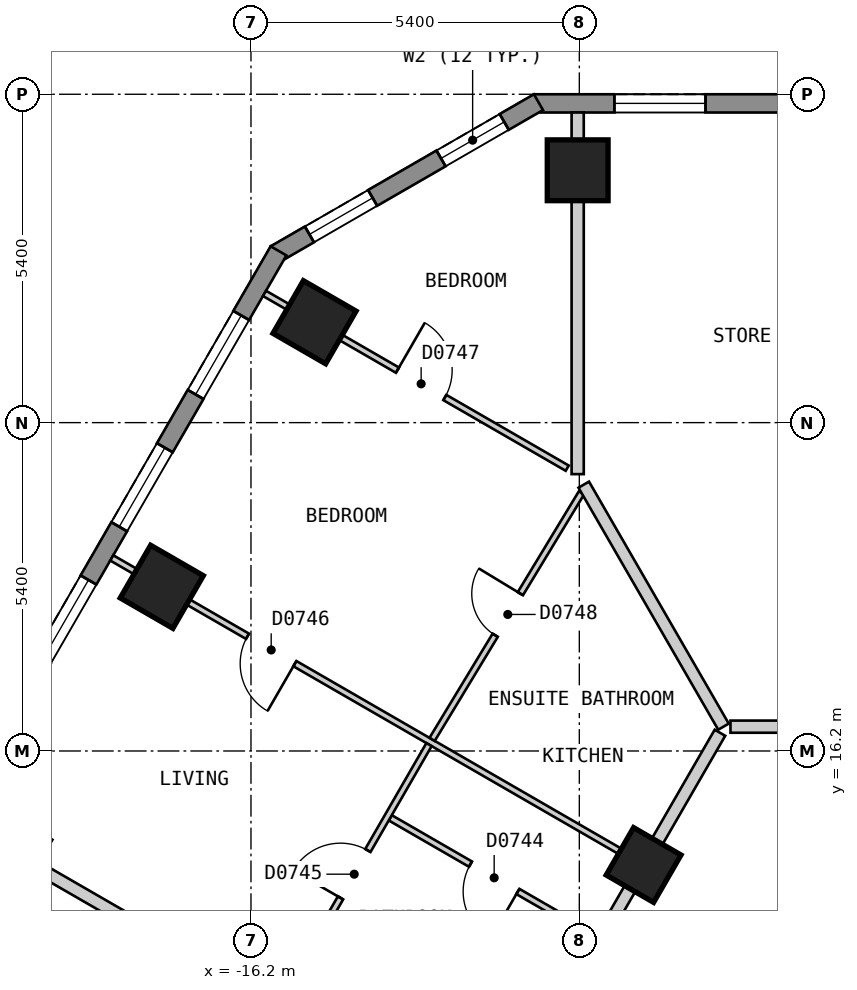
"""IFC4 building model, lengths in metres.
Left out: names, types, materials, properties, quantities, classifications, styles, units other than length and angle.
Written with IfcOpenShell. Run it as: python <this file> out.ifc"""

import sys

from ifc_helpers import new_model, si_unit, direction, frame, frame_2d, origin, origin_2d, place, context, subcontext, project, spatial, polyline, rectangle, outline, extrude, element, fill, save


model = new_model("IFC4")
c1 = context("Model", 3, precision=1e-05, world=origin(), true_north=direction((0.0, 1.0)))
c2 = subcontext(c1, "Body", "Model", "MODEL_VIEW")
j1 = project(units=[si_unit("LENGTHUNIT", "METRE"), si_unit("PLANEANGLEUNIT", "RADIAN")], contexts=[c1])
p1 = place(None, origin())
s1 = spatial("IfcSite", under=j1, at=p1, CompositionType="ELEMENT")
p2 = place(p1, origin())
s2 = spatial("IfcBuilding", under=s1, at=p2, CompositionType="ELEMENT")
p3 = place(p2, frame((0.0, 0.0, 105.0)))
s3 = spatial("IfcBuildingStorey", under=s2, at=p3, CompositionType="ELEMENT", Elevation=105.0)
for number, where, z_axis, x_axis in (
    (1, (-10.827, 25.75, 0.0), (0.0, 0.0, 1.0), (-1.0, 0.0, 0.0)),
    (2, (-15.155, 23.251, 0.0), (0.0, 0.0, 1.0), (-0.5, -0.866, 0.0)),
    (3, (-17.667, 18.9, 0.0), (0.0, 0.0, 1.0), (-0.5, -0.866, 0.0)),
):
    element("IfcColumn", number, at=place(p3, frame(where, z_axis=z_axis, x_axis=x_axis)), inside=s3, PredefinedType="COLUMN", context=c2, shape_type="SweptSolid", body=[
        extrude(rectangle(XDim=1.0, YDim=1.0, at=origin_2d()), origin(), (0.0, 0.0, 1.0), 3.0),
    ])
p4 = place(p3, frame((-9.743, 14.325, 0.0), z_axis=(0.0, 0.0, 1.0), x_axis=(-0.5, -0.866025403784, 0.0)))
e4 = element("IfcColumn", 4, at=p4, inside=s3, PredefinedType="COLUMN", context=c2, shape_type="SweptSolid", body=[
    extrude(rectangle(XDim=0.9, YDim=0.9, at=origin_2d()), origin(), (0.0, 0.0, 1.0), 3.0),
])
p5 = place(p3, frame((11.547, 26.85, 0.0), z_axis=(0.0, 0.0, 1.0), x_axis=(-1.0, 0.0, 0.0)))
e5 = element("IfcWall", 5, at=p5, inside=s3, PredefinedType="SOLIDWALL", context=c2, shape_type="SweptSolid", body=[
    extrude(outline(polyline([(0.0, -0.15), (23.094, -0.15), (23.014, 0.15), (0.08, 0.15), (0.0, -0.15)])), origin(), (0.0, 0.0, 1.0), 2.6),
])
p6 = place(p5, frame((1.325, 0.0, 0.15)))
e6 = element("IfcOpeningElement", 6, at=p6, cuts=e5, PredefinedType="OPENING", context=c2, shape_type="SweptSolid", body=[
    extrude(rectangle(XDim=1.5, YDim=2.1, at=frame_2d((0.75, 1.05))), frame((0.0, 0.16, 0.0), z_axis=(0.0, -1.0, 0.0), x_axis=(1.0, 0.0, 0.0)), (0.0, 0.0, 1.0), 0.32),
])
p7 = place(p5, frame((4.032, 0.0, 0.15)))
e7 = element("IfcOpeningElement", 7, at=p7, cuts=e5, PredefinedType="OPENING", context=c2, shape_type="SweptSolid", body=[
    extrude(rectangle(XDim=1.5, YDim=2.1, at=frame_2d((0.75, 1.05))), frame((0.0, 0.16, 0.0), z_axis=(0.0, -1.0, 0.0), x_axis=(1.0, 0.0, 0.0)), (0.0, 0.0, 1.0), 0.32),
])
p8 = place(p5, frame((6.738, 0.0, 0.15)))
e8 = element("IfcOpeningElement", 8, at=p8, cuts=e5, PredefinedType="OPENING", context=c2, shape_type="SweptSolid", body=[
    extrude(rectangle(XDim=1.5, YDim=2.1, at=frame_2d((0.75, 1.05))), frame((0.0, 0.16, 0.0), z_axis=(0.0, -1.0, 0.0), x_axis=(1.0, 0.0, 0.0)), (0.0, 0.0, 1.0), 0.32),
])
p9 = place(p5, frame((9.445, 0.0, 0.15)))
e9 = element("IfcOpeningElement", 9, at=p9, cuts=e5, PredefinedType="OPENING", context=c2, shape_type="SweptSolid", body=[
    extrude(rectangle(XDim=1.5, YDim=2.1, at=frame_2d((0.75, 1.05))), frame((0.0, 0.16, 0.0), z_axis=(0.0, -1.0, 0.0), x_axis=(1.0, 0.0, 0.0)), (0.0, 0.0, 1.0), 0.32),
])
p10 = place(p5, frame((12.151, 0.0, 0.15)))
e10 = element("IfcOpeningElement", 10, at=p10, cuts=e5, PredefinedType="OPENING", context=c2, shape_type="SweptSolid", body=[
    extrude(rectangle(XDim=1.5, YDim=2.1, at=frame_2d((0.75, 1.05))), frame((0.0, 0.16, 0.0), z_axis=(0.0, -1.0, 0.0), x_axis=(1.0, 0.0, 0.0)), (0.0, 0.0, 1.0), 0.32),
])
p11 = place(p5, frame((14.858, 0.0, 0.15)))
e11 = element("IfcOpeningElement", 11, at=p11, cuts=e5, PredefinedType="OPENING", context=c2, shape_type="SweptSolid", body=[
    extrude(rectangle(XDim=1.5, YDim=2.1, at=frame_2d((0.75, 1.05))), frame((0.0, 0.16, 0.0), z_axis=(0.0, -1.0, 0.0), x_axis=(1.0, 0.0, 0.0)), (0.0, 0.0, 1.0), 0.32),
])
p12 = place(p5, frame((17.564, 0.0, 0.15)))
e12 = element("IfcOpeningElement", 12, at=p12, cuts=e5, PredefinedType="OPENING", context=c2, shape_type="SweptSolid", body=[
    extrude(rectangle(XDim=1.5, YDim=2.1, at=frame_2d((0.75, 1.05))), frame((0.0, 0.16, 0.0), z_axis=(0.0, -1.0, 0.0), x_axis=(1.0, 0.0, 0.0)), (0.0, 0.0, 1.0), 0.32),
])
p13 = place(p5, frame((20.271, 0.0, 0.15)))
e13 = element("IfcOpeningElement", 13, at=p13, cuts=e5, PredefinedType="OPENING", context=c2, shape_type="SweptSolid", body=[
    extrude(rectangle(XDim=1.5, YDim=2.1, at=frame_2d((0.75, 1.05))), frame((0.0, 0.16, 0.0), z_axis=(0.0, -1.0, 0.0), x_axis=(1.0, 0.0, 0.0)), (0.0, 0.0, 1.0), 0.32),
])
p14 = place(p3, frame((-11.472, 26.87, 0.0), z_axis=(0.0, 0.0, 1.0), x_axis=(-0.866022959057, -0.500004234368, 0.0)))
e14 = element("IfcWall", 14, at=p14, inside=s3, PredefinedType="SOLIDWALL", context=c2, shape_type="SweptSolid", body=[
    extrude(outline(polyline([(0.0, -0.15), (5.0, -0.15), (4.92, 0.15), (0.08, 0.15), (0.0, -0.15)])), origin(), (0.0, 0.0, 1.0), 2.6),
])
p15 = place(p14, frame((0.65, 0.0, 0.15)))
e15 = element("IfcOpeningElement", 15, at=p15, cuts=e14, PredefinedType="OPENING", context=c2, shape_type="SweptSolid", body=[
    extrude(rectangle(XDim=1.2, YDim=2.1, at=frame_2d((0.6, 1.05))), frame((0.0, 0.16, 0.0), z_axis=(0.0, -1.0, 0.0), x_axis=(1.0, 0.0, 0.0)), (0.0, 0.0, 1.0), 0.32),
])
p16 = place(p14, frame((3.149, 0.0, 0.15)))
e16 = element("IfcOpeningElement", 16, at=p16, cuts=e14, PredefinedType="OPENING", context=c2, shape_type="SweptSolid", body=[
    extrude(rectangle(XDim=1.2, YDim=2.1, at=frame_2d((0.6, 1.05))), frame((0.0, 0.16, 0.0), z_axis=(0.0, -1.0, 0.0), x_axis=(1.0, 0.0, 0.0)), (0.0, 0.0, 1.0), 0.32),
])
p17 = place(p3, frame((-15.747, 24.425, 0.0), z_axis=(0.0, 0.0, 1.0), x_axis=(-0.500027479704, -0.866009537788, 0.0)))
e17 = element("IfcWall", 17, at=p17, inside=s3, PredefinedType="SOLIDWALL", context=c2, shape_type="SweptSolid", body=[
    extrude(outline(polyline([(0.0, -0.15), (26.559, -0.15), (26.478, 0.15), (0.08, 0.15), (0.0, -0.15)])), origin(), (0.0, 0.0, 1.0), 2.6),
])
p18 = place(p17, frame((1.227, 0.0, 0.15)))
e18 = element("IfcOpeningElement", 18, at=p18, cuts=e17, PredefinedType="OPENING", context=c2, shape_type="SweptSolid", body=[
    extrude(rectangle(XDim=1.5, YDim=2.1, at=frame_2d((0.75, 1.05))), frame((0.0, 0.16, 0.0), z_axis=(0.0, -1.0, 0.0), x_axis=(1.0, 0.0, 0.0)), (0.0, 0.0, 1.0), 0.32),
])
p19 = place(p17, frame((3.739, 0.0, 0.15)))
e19 = element("IfcOpeningElement", 19, at=p19, cuts=e17, PredefinedType="OPENING", context=c2, shape_type="SweptSolid", body=[
    extrude(rectangle(XDim=1.5, YDim=2.1, at=frame_2d((0.75, 1.05))), frame((0.0, 0.16, 0.0), z_axis=(0.0, -1.0, 0.0), x_axis=(1.0, 0.0, 0.0)), (0.0, 0.0, 1.0), 0.32),
])
p20 = place(p17, frame((6.25, 0.0, 0.15)))
e20 = element("IfcOpeningElement", 20, at=p20, cuts=e17, PredefinedType="OPENING", context=c2, shape_type="SweptSolid", body=[
    extrude(rectangle(XDim=1.5, YDim=2.1, at=frame_2d((0.75, 1.05))), frame((0.0, 0.16, 0.0), z_axis=(0.0, -1.0, 0.0), x_axis=(1.0, 0.0, 0.0)), (0.0, 0.0, 1.0), 0.32),
])
p21 = place(p17, frame((8.761, 0.0, 0.15)))
e21 = element("IfcOpeningElement", 21, at=p21, cuts=e17, PredefinedType="OPENING", context=c2, shape_type="SweptSolid", body=[
    extrude(rectangle(XDim=1.5, YDim=2.1, at=frame_2d((0.75, 1.05))), frame((0.0, 0.16, 0.0), z_axis=(0.0, -1.0, 0.0), x_axis=(1.0, 0.0, 0.0)), (0.0, 0.0, 1.0), 0.32),
])
p22 = place(p17, frame((11.273, 0.0, 0.15)))
e22 = element("IfcOpeningElement", 22, at=p22, cuts=e17, PredefinedType="OPENING", context=c2, shape_type="SweptSolid", body=[
    extrude(rectangle(XDim=1.5, YDim=2.1, at=frame_2d((0.75, 1.05))), frame((0.0, 0.16, 0.0), z_axis=(0.0, -1.0, 0.0), x_axis=(1.0, 0.0, 0.0)), (0.0, 0.0, 1.0), 0.32),
])
p23 = place(p17, frame((13.785, 0.0, 0.15)))
e23 = element("IfcOpeningElement", 23, at=p23, cuts=e17, PredefinedType="OPENING", context=c2, shape_type="SweptSolid", body=[
    extrude(rectangle(XDim=1.5, YDim=2.1, at=frame_2d((0.75, 1.05))), frame((0.0, 0.16, 0.0), z_axis=(0.0, -1.0, 0.0), x_axis=(1.0, 0.0, 0.0)), (0.0, 0.0, 1.0), 0.32),
])
p24 = place(p17, frame((16.296, 0.0, 0.15)))
e24 = element("IfcOpeningElement", 24, at=p24, cuts=e17, PredefinedType="OPENING", context=c2, shape_type="SweptSolid", body=[
    extrude(rectangle(XDim=1.5, YDim=2.1, at=frame_2d((0.75, 1.05))), frame((0.0, 0.16, 0.0), z_axis=(0.0, -1.0, 0.0), x_axis=(1.0, 0.0, 0.0)), (0.0, 0.0, 1.0), 0.32),
])
p25 = place(p17, frame((18.807, 0.0, 0.15)))
e25 = element("IfcOpeningElement", 25, at=p25, cuts=e17, PredefinedType="OPENING", context=c2, shape_type="SweptSolid", body=[
    extrude(rectangle(XDim=1.5, YDim=2.1, at=frame_2d((0.75, 1.05))), frame((0.0, 0.16, 0.0), z_axis=(0.0, -1.0, 0.0), x_axis=(1.0, 0.0, 0.0)), (0.0, 0.0, 1.0), 0.32),
])
p26 = place(p17, frame((21.319, 0.0, 0.15)))
e26 = element("IfcOpeningElement", 26, at=p26, cuts=e17, PredefinedType="OPENING", context=c2, shape_type="SweptSolid", body=[
    extrude(rectangle(XDim=1.5, YDim=2.1, at=frame_2d((0.75, 1.05))), frame((0.0, 0.16, 0.0), z_axis=(0.0, -1.0, 0.0), x_axis=(1.0, 0.0, 0.0)), (0.0, 0.0, 1.0), 0.32),
])
p27 = place(p17, frame((23.831, 0.0, 0.15)))
e27 = element("IfcOpeningElement", 27, at=p27, cuts=e17, PredefinedType="OPENING", context=c2, shape_type="SweptSolid", body=[
    extrude(rectangle(XDim=1.5, YDim=2.1, at=frame_2d((0.75, 1.05))), frame((0.0, 0.16, 0.0), z_axis=(0.0, -1.0, 0.0), x_axis=(1.0, 0.0, 0.0)), (0.0, 0.0, 1.0), 0.32),
])
p28 = place(p3, frame((-8.314, 16.6, 0.0), z_axis=(0.0, 0.0, 1.0), x_axis=(1.0, 0.0, 0.0)))
e28 = element("IfcWall", 28, at=p28, inside=s3, PredefinedType="PARTITIONING", context=c2, shape_type="SweptSolid", body=[
    extrude(rectangle(XDim=2.309, YDim=0.2, at=frame_2d((1.155, 0.0))), origin(), (0.0, 0.0, 1.0), 2.6),
])
p29 = place(p28, frame((0.977, 0.0, 0.0)))
e29 = element("IfcOpeningElement", 29, at=p29, cuts=e28, PredefinedType="OPENING", context=c2, shape_type="SweptSolid", body=[
    extrude(rectangle(XDim=0.8, YDim=2.1, at=frame_2d((0.4, 1.05))), frame((0.0, 0.11, 0.0), z_axis=(0.0, -1.0, 0.0), x_axis=(1.0, 0.0, 0.0)), (0.0, 0.0, 1.0), 0.22),
])
p30 = place(p3, frame((-18.533, -0.901, 0.0), z_axis=(0.0, 0.0, 1.0), x_axis=(0.499981198768, 0.866036258409, 0.0)))
e30 = element("IfcWall", 30, at=p30, inside=s3, PredefinedType="PARTITIONING", context=c2, shape_type="SweptSolid", body=[
    extrude(rectangle(XDim=20.093, YDim=0.2, at=frame_2d((10.046, 0.0))), origin(), (0.0, 0.0, 1.0), 2.6),
])
p31 = place(p30, frame((14.57, 0.0, 0.0)))
e31 = element("IfcOpeningElement", 31, at=p31, cuts=e30, PredefinedType="OPENING", context=c2, shape_type="SweptSolid", body=[
    extrude(rectangle(XDim=1.0, YDim=2.1, at=frame_2d((0.5, 1.05))), frame((0.0, 0.11, 0.0), z_axis=(0.0, -1.0, 0.0), x_axis=(1.0, 0.0, 0.0)), (0.0, 0.0, 1.0), 0.22),
])
p32 = place(p30, frame((4.523, 0.0, 0.0)))
e32 = element("IfcOpeningElement", 32, at=p32, cuts=e30, PredefinedType="OPENING", context=c2, shape_type="SweptSolid", body=[
    extrude(rectangle(XDim=1.0, YDim=2.1, at=frame_2d((0.5, 1.05))), frame((0.0, 0.11, 0.0), z_axis=(0.0, -1.0, 0.0), x_axis=(1.0, 0.0, 0.0)), (0.0, 0.0, 1.0), 0.22),
])
p33 = place(p3, frame((-13.909, 15.101, 0.0), z_axis=(0.0, 0.0, 1.0), x_axis=(0.866024880635, -0.500000906121, 0.0)))
e33 = element("IfcWall", 33, at=p33, inside=s3, PredefinedType="PARTITIONING", context=c2, shape_type="SweptSolid", body=[
    extrude(rectangle(XDim=3.896, YDim=0.1, at=frame_2d((1.948, 0.0))), origin(), (0.0, 0.0, 1.0), 2.6),
])
p34 = place(p33, frame((1.523, 0.0, 0.0)))
e34 = element("IfcOpeningElement", 34, at=p34, cuts=e33, PredefinedType="OPENING", context=c2, shape_type="SweptSolid", body=[
    extrude(rectangle(XDim=0.9, YDim=2.1, at=frame_2d((0.45, 1.05))), frame((0.0, 0.06, 0.0), z_axis=(0.0, -1.0, 0.0), x_axis=(1.0, 0.0, 0.0)), (0.0, 0.0, 1.0), 0.12),
])
p35 = place(p3, frame((-18.489, 19.375, 0.0), z_axis=(0.0, 0.0, 1.0), x_axis=(0.866016855193, -0.500014806302, 0.0)))
e35 = element("IfcWall", 35, at=p35, inside=s3, PredefinedType="PARTITIONING", context=c2, shape_type="SweptSolid", body=[
    extrude(rectangle(XDim=10.0, YDim=0.1, at=frame_2d((5.0, 0.0))), origin(), (0.0, 0.0, 1.0), 2.6),
])
p36 = place(p35, frame((2.577, 0.0, 0.0)))
e36 = element("IfcOpeningElement", 36, at=p36, cuts=e35, PredefinedType="OPENING", context=c2, shape_type="SweptSolid", body=[
    extrude(rectangle(XDim=0.9, YDim=2.1, at=frame_2d((0.45, 1.05))), frame((0.0, 0.06, 0.0), z_axis=(0.0, -1.0, 0.0), x_axis=(1.0, 0.0, 0.0)), (0.0, 0.0, 1.0), 0.12),
])
p37 = place(p3, frame((-15.977, 23.725, 0.0), z_axis=(0.0, 0.0, 1.0), x_axis=(0.866028566888, -0.499994521305, 0.0)))
e37 = element("IfcWall", 37, at=p37, inside=s3, PredefinedType="PARTITIONING", context=c2, shape_type="SweptSolid", body=[
    extrude(rectangle(XDim=5.748, YDim=0.1, at=frame_2d((2.874, 0.0))), origin(), (0.0, 0.0, 1.0), 2.6),
])
p38 = place(p37, frame((2.524, 0.0, 0.0)))
e38 = element("IfcOpeningElement", 38, at=p38, cuts=e37, PredefinedType="OPENING", context=c2, shape_type="SweptSolid", body=[
    extrude(rectangle(XDim=0.9, YDim=2.1, at=frame_2d((0.45, 1.05))), frame((0.0, 0.06, 0.0), z_axis=(0.0, -1.0, 0.0), x_axis=(1.0, 0.0, 0.0)), (0.0, 0.0, 1.0), 0.12),
])
p39 = place(p3, frame((-13.221, 16.391, 0.0), z_axis=(0.0, 0.0, 1.0), x_axis=(0.518164725284, 0.855280841286, 0.0)))
e39 = element("IfcWall", 39, at=p39, inside=s3, PredefinedType="PARTITIONING", context=c2, shape_type="SweptSolid", body=[
    extrude(rectangle(XDim=4.74, YDim=0.1, at=frame_2d((2.37, 0.0))), origin(), (0.0, 0.0, 1.0), 2.6),
])
p40 = place(p39, frame((2.002, 0.0, 0.0)))
e40 = element("IfcOpeningElement", 40, at=p40, cuts=e39, PredefinedType="OPENING", context=c2, shape_type="SweptSolid", body=[
    extrude(rectangle(XDim=0.8, YDim=2.1, at=frame_2d((0.4, 1.05))), frame((0.0, 0.06, 0.0), z_axis=(0.0, -1.0, 0.0), x_axis=(1.0, 0.0, 0.0)), (0.0, 0.0, 1.0), 0.12),
])
p41 = place(p3, frame((-15.708, 12.085, 0.0), z_axis=(0.0, 0.0, 1.0), x_axis=(0.499943653708, 0.866057932887, 0.0)))
e41 = element("IfcWall", 41, at=p41, inside=s3, PredefinedType="PARTITIONING", context=c2, shape_type="SweptSolid", body=[
    extrude(rectangle(XDim=4.873, YDim=0.1, at=frame_2d((2.436, 0.0))), origin(), (0.0, 0.0, 1.0), 2.6),
])
p42 = place(p41, frame((1.962, 0.0, 0.0)))
e42 = element("IfcOpeningElement", 42, at=p42, cuts=e41, PredefinedType="OPENING", context=c2, shape_type="SweptSolid", body=[
    extrude(rectangle(XDim=0.9, YDim=2.1, at=frame_2d((0.45, 1.05))), frame((0.0, 0.06, 0.0), z_axis=(0.0, -1.0, 0.0), x_axis=(1.0, 0.0, 0.0)), (0.0, 0.0, 1.0), 0.12),
])
p43 = place(p3, frame((-10.727, 20.58, 0.0), z_axis=(0.0, 0.0, 1.0), x_axis=(0.500041272028, -0.866001574057, 0.0)))
e43 = element("IfcWall", 43, at=p43, inside=s3, PredefinedType="PARTITIONING", context=c2, shape_type="SweptSolid", body=[
    extrude(rectangle(XDim=4.596, YDim=0.2, at=frame_2d((2.298, 0.0))), origin(), (0.0, 0.0, 1.0), 2.6),
])
p44 = place(p3, frame((-21.001, 15.025, 0.0), z_axis=(0.0, 0.0, 1.0), x_axis=(0.866031754707, -0.499988999718, 0.0)))
e44 = element("IfcWall", 44, at=p44, inside=s3, PredefinedType="PARTITIONING", context=c2, shape_type="SweptSolid", body=[
    extrude(rectangle(XDim=5.92, YDim=0.2, at=frame_2d((2.96, 0.0))), origin(), (0.0, 0.0, 1.0), 2.6),
])
p45 = place(p3, frame((-10.827, 20.753, 0.0), z_axis=(0.0, 0.0, 1.0), x_axis=(0.0, 1.0, 0.0)))
e45 = element("IfcWall", 45, at=p45, inside=s3, PredefinedType="PARTITIONING", context=c2, shape_type="SweptSolid", body=[
    extrude(rectangle(XDim=5.947, YDim=0.2, at=frame_2d((2.974, 0.0))), origin(), (0.0, 0.0, 1.0), 2.6),
])
p46 = place(p13, origin())
e46 = element("IfcWindow", 46, at=p46, inside=s3, PartitioningType="SINGLE_PANEL", PredefinedType="WINDOW", context=c2, shape_type="SweptSolid", body=[
    extrude(rectangle(XDim=1.5, YDim=2.1, at=frame_2d((0.75, 1.05))), frame((0.0, 0.03, 0.0), z_axis=(0.0, -1.0, 0.0), x_axis=(1.0, 0.0, 0.0)), (0.0, 0.0, 1.0), 0.06),
])
fill(e13, e46)
p47 = place(p15, origin())
e47 = element("IfcWindow", 47, at=p47, inside=s3, PartitioningType="SINGLE_PANEL", PredefinedType="WINDOW", context=c2, shape_type="SweptSolid", body=[
    extrude(rectangle(XDim=1.2, YDim=2.1, at=frame_2d((0.6, 1.05))), frame((0.0, 0.03, 0.0), z_axis=(0.0, -1.0, 0.0), x_axis=(1.0, 0.0, 0.0)), (0.0, 0.0, 1.0), 0.06),
])
fill(e15, e47)
p48 = place(p16, origin())
e48 = element("IfcWindow", 48, at=p48, inside=s3, PartitioningType="SINGLE_PANEL", PredefinedType="WINDOW", context=c2, shape_type="SweptSolid", body=[
    extrude(rectangle(XDim=1.2, YDim=2.1, at=frame_2d((0.6, 1.05))), frame((0.0, 0.03, 0.0), z_axis=(0.0, -1.0, 0.0), x_axis=(1.0, 0.0, 0.0)), (0.0, 0.0, 1.0), 0.06),
])
fill(e16, e48)
p49 = place(p18, origin())
e49 = element("IfcWindow", 49, at=p49, inside=s3, PartitioningType="SINGLE_PANEL", PredefinedType="WINDOW", context=c2, shape_type="SweptSolid", body=[
    extrude(rectangle(XDim=1.5, YDim=2.1, at=frame_2d((0.75, 1.05))), frame((0.0, 0.03, 0.0), z_axis=(0.0, -1.0, 0.0), x_axis=(1.0, 0.0, 0.0)), (0.0, 0.0, 1.0), 0.06),
])
fill(e18, e49)
p50 = place(p19, origin())
e50 = element("IfcWindow", 50, at=p50, inside=s3, PartitioningType="SINGLE_PANEL", PredefinedType="WINDOW", context=c2, shape_type="SweptSolid", body=[
    extrude(rectangle(XDim=1.5, YDim=2.1, at=frame_2d((0.75, 1.05))), frame((0.0, 0.03, 0.0), z_axis=(0.0, -1.0, 0.0), x_axis=(1.0, 0.0, 0.0)), (0.0, 0.0, 1.0), 0.06),
])
fill(e19, e50)
p51 = place(p20, origin())
e51 = element("IfcWindow", 51, at=p51, inside=s3, PartitioningType="SINGLE_PANEL", PredefinedType="WINDOW", context=c2, shape_type="SweptSolid", body=[
    extrude(rectangle(XDim=1.5, YDim=2.1, at=frame_2d((0.75, 1.05))), frame((0.0, 0.03, 0.0), z_axis=(0.0, -1.0, 0.0), x_axis=(1.0, 0.0, 0.0)), (0.0, 0.0, 1.0), 0.06),
])
fill(e20, e51)
p52 = place(p34, origin())
e52 = element("IfcDoor", 52, at=p52, inside=s3, OperationType="SINGLE_SWING_RIGHT", PredefinedType="DOOR", context=c2, shape_type="SweptSolid", body=[
    extrude(rectangle(XDim=0.9, YDim=2.1, at=frame_2d((0.45, 1.05))), frame((0.0, 0.025, 0.0), z_axis=(0.0, -1.0, 0.0), x_axis=(1.0, 0.0, 0.0)), (0.0, 0.0, 1.0), 0.05),
])
fill(e34, e52)
p53 = place(p42, origin())
e53 = element("IfcDoor", 53, at=p53, inside=s3, OperationType="SINGLE_SWING_LEFT", PredefinedType="DOOR", context=c2, shape_type="SweptSolid", body=[
    extrude(rectangle(XDim=0.9, YDim=2.1, at=frame_2d((0.45, 1.05))), frame((0.0, 0.025, 0.0), z_axis=(0.0, -1.0, 0.0), x_axis=(1.0, 0.0, 0.0)), (0.0, 0.0, 1.0), 0.05),
])
fill(e42, e53)
p54 = place(p36, origin())
e54 = element("IfcDoor", 54, at=p54, inside=s3, OperationType="SINGLE_SWING_RIGHT", PredefinedType="DOOR", context=c2, shape_type="SweptSolid", body=[
    extrude(rectangle(XDim=0.9, YDim=2.1, at=frame_2d((0.45, 1.05))), frame((0.0, 0.025, 0.0), z_axis=(0.0, -1.0, 0.0), x_axis=(1.0, 0.0, 0.0)), (0.0, 0.0, 1.0), 0.05),
])
fill(e36, e54)
p55 = place(p38, origin())
e55 = element("IfcDoor", 55, at=p55, inside=s3, OperationType="SINGLE_SWING_LEFT", PredefinedType="DOOR", context=c2, shape_type="SweptSolid", body=[
    extrude(rectangle(XDim=0.9, YDim=2.1, at=frame_2d((0.45, 1.05))), frame((0.0, 0.025, 0.0), z_axis=(0.0, -1.0, 0.0), x_axis=(1.0, 0.0, 0.0)), (0.0, 0.0, 1.0), 0.05),
])
fill(e38, e55)
p56 = place(p40, origin())
e56 = element("IfcDoor", 56, at=p56, inside=s3, OperationType="SINGLE_SWING_RIGHT", PredefinedType="DOOR", context=c2, shape_type="SweptSolid", body=[
    extrude(rectangle(XDim=0.8, YDim=2.1, at=frame_2d((0.4, 1.05))), frame((0.0, 0.025, 0.0), z_axis=(0.0, -1.0, 0.0), x_axis=(1.0, 0.0, 0.0)), (0.0, 0.0, 1.0), 0.05),
])
fill(e40, e56)
save(model, sys.argv[1])
